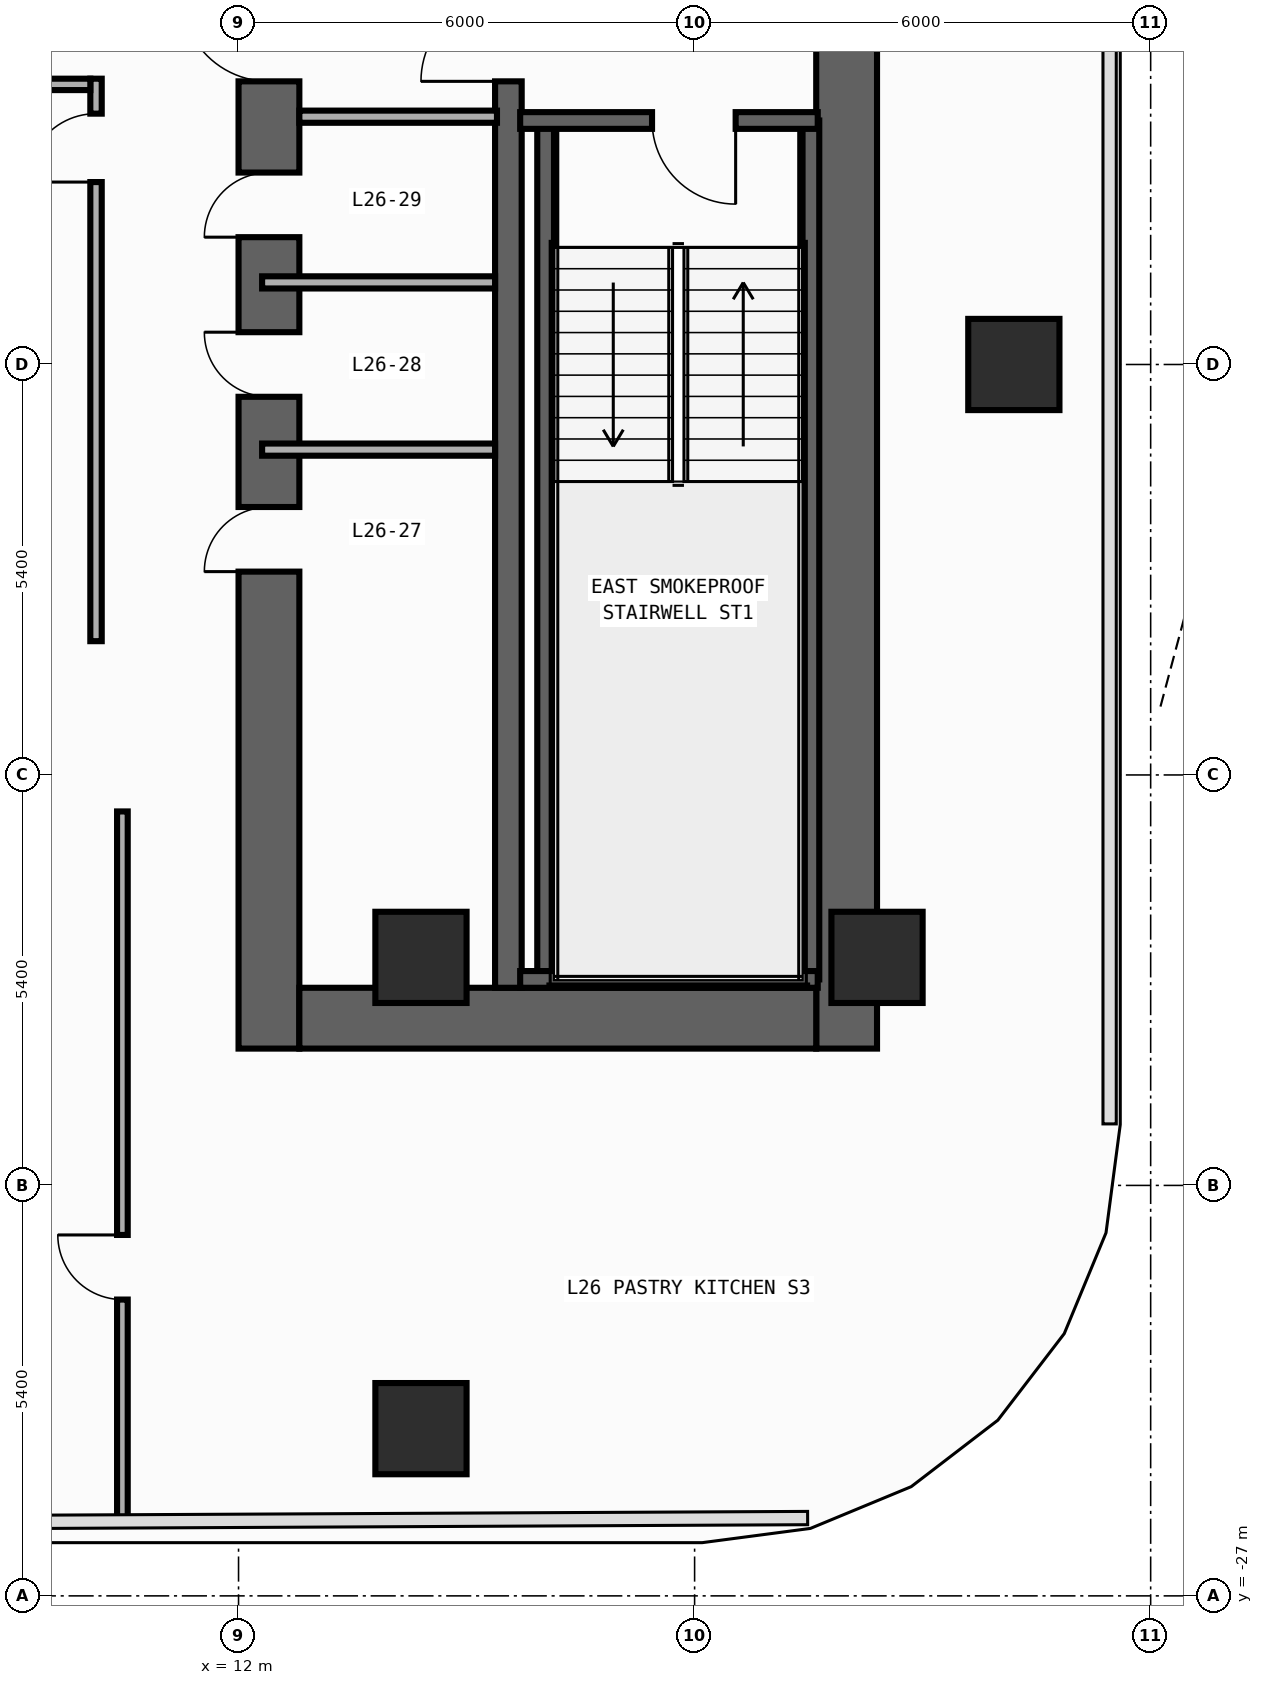
"""IFC4 building model, lengths in metres.
Left out: names, types, materials, properties, quantities, classifications, styles, units other than length and angle.
Written with IfcOpenShell. Run it as: python <this file> out.ifc"""

import sys

from ifc_helpers import new_model, si_unit, direction, frame, frame_2d, origin, origin_2d, place, context, subcontext, project, spatial, rectangle, extrude, element, fill, save


model = new_model("IFC4")
c1 = context("Model", 3, precision=1e-05, world=origin(), true_north=direction((0.0, 1.0)))
c2 = subcontext(c1, "Body", "Model", "MODEL_VIEW")
j1 = project(units=[si_unit("LENGTHUNIT", "METRE"), si_unit("PLANEANGLEUNIT", "RADIAN")], contexts=[c1])
p1 = place(None, origin())
s1 = spatial("IfcSite", under=j1, at=p1, CompositionType="ELEMENT")
p2 = place(p1, origin())
s2 = spatial("IfcBuilding", under=s1, at=p2, CompositionType="ELEMENT")
p3 = place(p2, frame((0.0, 0.0, 114.2)))
s3 = spatial("IfcBuildingStorey", under=s2, at=p3, CompositionType="ELEMENT", Elevation=114.2)
p4 = place(p3, frame((12.4, -19.8, 0.0), z_axis=(0.0, 0.0, 1.0), x_axis=(0.0, 1.0, 0.0)))
e1 = element("IfcWall", 1, at=p4, inside=s3, PredefinedType="SHEAR", context=c2, shape_type="SweptSolid", body=[
    extrude(rectangle(XDim=27.0, YDim=0.8, at=frame_2d((13.5, 0.0))), origin(), (0.0, 0.0, 1.0), 3.94),
])
p5 = place(p4, frame((23.05, 0.0, 0.0)))
e2 = element("IfcOpeningElement", 2, at=p5, cuts=e1, PredefinedType="OPENING", context=c2, shape_type="SweptSolid", body=[
    extrude(rectangle(XDim=1.1, YDim=2.2, at=frame_2d((0.55, 1.1))), frame((0.0, 0.41, 0.0), z_axis=(0.0, -1.0, 0.0), x_axis=(1.0, 0.0, 0.0)), (0.0, 0.0, 1.0), 0.82),
])
p6 = place(p4, frame((19.85, 0.0, 0.0)))
e3 = element("IfcOpeningElement", 3, at=p6, cuts=e1, PredefinedType="OPENING", context=c2, shape_type="SweptSolid", body=[
    extrude(rectangle(XDim=1.1, YDim=2.2, at=frame_2d((0.55, 1.1))), frame((0.0, 0.41, 0.0), z_axis=(0.0, -1.0, 0.0), x_axis=(1.0, 0.0, 0.0)), (0.0, 0.0, 1.0), 0.82),
])
p7 = place(p4, frame((16.65, 0.0, 0.0)))
e4 = element("IfcOpeningElement", 4, at=p7, cuts=e1, PredefinedType="OPENING", context=c2, shape_type="SweptSolid", body=[
    extrude(rectangle(XDim=1.1, YDim=2.2, at=frame_2d((0.55, 1.1))), frame((0.0, 0.41, 0.0), z_axis=(0.0, -1.0, 0.0), x_axis=(1.0, 0.0, 0.0)), (0.0, 0.0, 1.0), 0.82),
])
p8 = place(p4, frame((6.275, 0.0, 0.0)))
e5 = element("IfcOpeningElement", 5, at=p8, cuts=e1, PredefinedType="OPENING", context=c2, shape_type="SweptSolid", body=[
    extrude(rectangle(XDim=0.85, YDim=2.1, at=frame_2d((0.425, 1.05))), frame((0.0, 0.41, 0.0), z_axis=(0.0, -1.0, 0.0), x_axis=(1.0, 0.0, 0.0)), (0.0, 0.0, 1.0), 0.82),
])
p9 = place(p4, frame((8.575, 0.0, 0.0)))
e6 = element("IfcOpeningElement", 6, at=p9, cuts=e1, PredefinedType="OPENING", context=c2, shape_type="SweptSolid", body=[
    extrude(rectangle(XDim=0.85, YDim=2.1, at=frame_2d((0.425, 1.05))), frame((0.0, 0.41, 0.0), z_axis=(0.0, -1.0, 0.0), x_axis=(1.0, 0.0, 0.0)), (0.0, 0.0, 1.0), 0.82),
])
p10 = place(p4, frame((10.675, 0.0, 0.0)))
e7 = element("IfcOpeningElement", 7, at=p10, cuts=e1, PredefinedType="OPENING", context=c2, shape_type="SweptSolid", body=[
    extrude(rectangle(XDim=0.85, YDim=2.1, at=frame_2d((0.425, 1.05))), frame((0.0, 0.41, 0.0), z_axis=(0.0, -1.0, 0.0), x_axis=(1.0, 0.0, 0.0)), (0.0, 0.0, 1.0), 0.82),
])
p11 = place(p4, frame((12.725, 0.0, 0.0)))
e8 = element("IfcOpeningElement", 8, at=p11, cuts=e1, PredefinedType="OPENING", context=c2, shape_type="SweptSolid", body=[
    extrude(rectangle(XDim=1.15, YDim=2.2, at=frame_2d((0.575, 1.1))), frame((0.0, 0.41, 0.0), z_axis=(0.0, -1.0, 0.0), x_axis=(1.0, 0.0, 0.0)), (0.0, 0.0, 1.0), 0.82),
])
p12 = place(p4, frame((25.125, 0.0, 0.0)))
e9 = element("IfcOpeningElement", 9, at=p12, cuts=e1, PredefinedType="OPENING", context=c2, shape_type="SweptSolid", body=[
    extrude(rectangle(XDim=0.85, YDim=2.1, at=frame_2d((0.425, 1.05))), frame((0.0, 0.41, 0.0), z_axis=(0.0, -1.0, 0.0), x_axis=(1.0, 0.0, 0.0)), (0.0, 0.0, 1.0), 0.82),
])
p13 = place(p3, frame((20.0, -19.8, 0.0), z_axis=(0.0, 0.0, 1.0), x_axis=(0.0, 1.0, 0.0)))
e10 = element("IfcWall", 10, at=p13, inside=s3, PredefinedType="SHEAR", context=c2, shape_type="SweptSolid", body=[
    extrude(rectangle(XDim=27.0, YDim=0.8, at=frame_2d((13.5, 0.0))), origin(), (0.0, 0.0, 1.0), 3.94),
])
p14 = place(p3, frame((12.8, -19.4, 0.0), z_axis=(0.0, 0.0, 1.0), x_axis=(1.0, 0.0, 0.0)))
e11 = element("IfcWall", 11, at=p14, inside=s3, PredefinedType="SHEAR", context=c2, shape_type="SweptSolid", body=[
    extrude(rectangle(XDim=6.8, YDim=0.8, at=frame_2d((3.4, 0.0))), origin(), (0.0, 0.0, 1.0), 3.94),
])
p15 = place(p3, frame((15.55, -19.0, 0.0), z_axis=(0.0, 0.0, 1.0), x_axis=(0.0, 1.0, 0.0)))
e12 = element("IfcWall", 12, at=p15, inside=s3, PredefinedType="SHEAR", context=c2, shape_type="SweptSolid", body=[
    extrude(rectangle(XDim=25.4, YDim=0.35, at=frame_2d((12.7, 0.0))), origin(), (0.0, 0.0, 1.0), 3.94),
])
p16 = place(p15, frame((11.925, 0.0, 0.0)))
e13 = element("IfcOpeningElement", 13, at=p16, cuts=e12, PredefinedType="OPENING", context=c2, shape_type="SweptSolid", body=[
    extrude(rectangle(XDim=1.15, YDim=2.2, at=frame_2d((0.575, 1.1))), frame((0.0, 0.185, 0.0), z_axis=(0.0, -1.0, 0.0), x_axis=(1.0, 0.0, 0.0)), (0.0, 0.0, 1.0), 0.37),
])
p17 = place(p15, frame((24.325, 0.0, 0.0)))
e14 = element("IfcOpeningElement", 14, at=p17, cuts=e12, PredefinedType="OPENING", context=c2, shape_type="SweptSolid", body=[
    extrude(rectangle(XDim=0.85, YDim=2.1, at=frame_2d((0.425, 1.05))), frame((0.0, 0.185, 0.0), z_axis=(0.0, -1.0, 0.0), x_axis=(1.0, 0.0, 0.0)), (0.0, 0.0, 1.0), 0.37),
])
for number, where, z_axis, x_axis in (
    (15, (16.04, -18.89, 0.0), (0.0, 0.0, 1.0), (0.0, 1.0, 0.0)),
    (16, (19.53, -18.89, 0.0), (0.0, 0.0, 1.0), (0.0, 1.0, 0.0)),
):
    element("IfcWall", number, at=place(p3, frame(where, z_axis=z_axis, x_axis=x_axis)), inside=s3, PredefinedType="SHEAR", context=c2, shape_type="SweptSolid", body=[
        extrude(rectangle(XDim=11.3, YDim=0.22, at=frame_2d((5.65, 0.0))), origin(), (0.0, 0.0, 1.0), 3.94),
    ])
p18 = place(p3, frame((15.705, -18.89, 0.0), z_axis=(0.0, 0.0, 1.0), x_axis=(1.0, 0.0, 0.0)))
e17 = element("IfcWall", 17, at=p18, inside=s3, PredefinedType="SHEAR", context=c2, shape_type="SweptSolid", body=[
    extrude(rectangle(XDim=3.915, YDim=0.22, at=frame_2d((1.958, 0.0))), origin(), (0.0, 0.0, 1.0), 3.94),
])
p19 = place(p3, frame((19.62, -7.59, 0.0), z_axis=(0.0, 0.0, 1.0), x_axis=(-1.0, 0.0, 0.0)))
e18 = element("IfcWall", 18, at=p19, inside=s3, PredefinedType="SHEAR", context=c2, shape_type="SweptSolid", body=[
    extrude(rectangle(XDim=3.915, YDim=0.22, at=frame_2d((1.958, 0.0))), origin(), (0.0, 0.0, 1.0), 3.94),
])
p20 = place(p19, frame((1.08, 0.0, 0.0)))
e19 = element("IfcOpeningElement", 19, at=p20, cuts=e18, PredefinedType="OPENING", context=c2, shape_type="SweptSolid", body=[
    extrude(rectangle(XDim=1.1, YDim=2.2, at=frame_2d((0.55, 1.1))), frame((0.0, 0.12, 0.0), z_axis=(0.0, -1.0, 0.0), x_axis=(1.0, 0.0, 0.0)), (0.0, 0.0, 1.0), 0.24),
])
for number, where, z_axis, x_axis in (
    (20, (20.4, -18.6, 0.0), (0.0, 0.0, 1.0), (1.0, 0.0, 0.0)),
    (21, (14.4, -18.6, 0.0), (0.0, 0.0, 1.0), (1.0, 0.0, 0.0)),
    (22, (22.2, -10.8, 0.0), (0.0, 0.0, 1.0), (1.0, 0.0, 0.0)),
    (23, (14.4, -24.8, 0.0), (0.0, 0.0, 1.0), (1.0, 0.0, 0.0)),
):
    element("IfcColumn", number, at=place(p3, frame(where, z_axis=z_axis, x_axis=x_axis)), inside=s3, PredefinedType="COLUMN", context=c2, shape_type="SweptSolid", body=[
        extrude(rectangle(XDim=1.2, YDim=1.2, at=origin_2d()), origin(), (0.0, 0.0, 1.0), 4.2),
    ])
p21 = place(p3, frame((12.8, -7.54, 0.0), z_axis=(0.0, 0.0, 1.0), x_axis=(1.0, 0.0, 0.0)))
e24 = element("IfcWall", 24, at=p21, inside=s3, PredefinedType="STANDARD", context=c2, shape_type="SweptSolid", body=[
    extrude(rectangle(XDim=2.6, YDim=0.16, at=frame_2d((1.3, 0.0))), origin(), (0.0, 0.0, 1.0), 3.94),
])
for number, where, z_axis, x_axis in (
    (25, (12.31, -11.92, 0.0), (0.0, 0.0, 1.0), (1.0, 0.0, 0.0)),
    (26, (12.31, -9.72, 0.0), (0.0, 0.0, 1.0), (1.0, 0.0, 0.0)),
):
    element("IfcWall", number, at=place(p3, frame(where, z_axis=z_axis, x_axis=x_axis)), inside=s3, PredefinedType="PARTITIONING", context=c2, shape_type="SweptSolid", body=[
        extrude(rectangle(XDim=3.065, YDim=0.16, at=frame_2d((1.532, 0.0))), origin(), (0.0, 0.0, 1.0), 3.94),
    ])
p22 = place(p3, frame((10.125, -14.44, 0.0), z_axis=(0.0, 0.0, 1.0), x_axis=(0.0, 1.0, 0.0)))
e27 = element("IfcWall", 27, at=p22, inside=s3, PredefinedType="PARTITIONING", context=c2, shape_type="SweptSolid", body=[
    extrude(rectangle(XDim=7.4, YDim=0.15, at=frame_2d((3.7, 0.0))), origin(), (0.0, 0.0, 1.0), 3.94),
])
p23 = place(p22, frame((6.04, 0.0, 0.0)))
e28 = element("IfcOpeningElement", 28, at=p23, cuts=e27, PredefinedType="OPENING", context=c2, shape_type="SweptSolid", body=[
    extrude(rectangle(XDim=0.9, YDim=2.15, at=frame_2d((0.45, 1.075))), frame((0.0, 0.085, 0.0), z_axis=(0.0, -1.0, 0.0), x_axis=(1.0, 0.0, 0.0)), (0.0, 0.0, 1.0), 0.17),
])
p24 = place(p3, frame((-0.015, -7.115, 0.0), z_axis=(0.0, 0.0, 1.0), x_axis=(1.0, 0.0, 0.0)))
e29 = element("IfcWall", 29, at=p24, inside=s3, PredefinedType="PARTITIONING", context=c2, shape_type="SweptSolid", body=[
    extrude(rectangle(XDim=10.065, YDim=0.15, at=frame_2d((5.032, 0.0))), origin(), (0.0, 0.0, 1.0), 3.94),
])
p25 = place(p24, frame((0.46, 0.0, 0.0)))
e30 = element("IfcOpeningElement", 30, at=p25, cuts=e29, PredefinedType="OPENING", context=c2, shape_type="SweptSolid", body=[
    extrude(rectangle(XDim=0.9, YDim=2.15, at=frame_2d((0.45, 1.075))), frame((0.0, 0.085, 0.0), z_axis=(0.0, -1.0, 0.0), x_axis=(1.0, 0.0, 0.0)), (0.0, 0.0, 1.0), 0.17),
])
p26 = place(p3, frame((10.472, -26.015, 0.0), z_axis=(0.0, 0.0, 1.0), x_axis=(0.0, 1.0, 0.0)))
e31 = element("IfcWall", 31, at=p26, inside=s3, PredefinedType="PARTITIONING", context=c2, shape_type="SweptSolid", body=[
    extrude(rectangle(XDim=9.335, YDim=0.14, at=frame_2d((4.668, 0.0))), origin(), (0.0, 0.0, 1.0), 3.94),
])
p27 = place(p26, frame((2.914, 0.0, 0.0)))
e32 = element("IfcOpeningElement", 32, at=p27, cuts=e31, PredefinedType="OPENING", context=c2, shape_type="SweptSolid", body=[
    extrude(rectangle(XDim=0.85, YDim=2.1, at=frame_2d((0.425, 1.05))), frame((0.0, 0.08, 0.0), z_axis=(0.0, -1.0, 0.0), x_axis=(1.0, 0.0, 0.0)), (0.0, 0.0, 1.0), 0.16),
])
p28 = place(p20, origin())
e33 = element("IfcDoor", 33, at=p28, inside=s3, OperationType="SINGLE_SWING_LEFT", PredefinedType="DOOR", context=c2, shape_type="SweptSolid", body=[
    extrude(rectangle(XDim=1.1, YDim=2.2, at=frame_2d((0.55, 1.1))), frame((0.0, 0.025, 0.0), z_axis=(0.0, -1.0, 0.0), x_axis=(1.0, 0.0, 0.0)), (0.0, 0.0, 1.0), 0.05),
])
fill(e19, e33)
p29 = place(p8, origin())
e34 = element("IfcDoor", 34, at=p29, inside=s3, OperationType="SINGLE_SWING_LEFT", PredefinedType="DOOR", context=c2, shape_type="SweptSolid", body=[
    extrude(rectangle(XDim=0.85, YDim=2.1, at=frame_2d((0.425, 1.05))), frame((0.0, 0.025, 0.0), z_axis=(0.0, -1.0, 0.0), x_axis=(1.0, 0.0, 0.0)), (0.0, 0.0, 1.0), 0.05),
])
fill(e5, e34)
p30 = place(p9, origin())
e35 = element("IfcDoor", 35, at=p30, inside=s3, OperationType="SINGLE_SWING_RIGHT", PredefinedType="DOOR", context=c2, shape_type="SweptSolid", body=[
    extrude(rectangle(XDim=0.85, YDim=2.1, at=frame_2d((0.425, 1.05))), frame((0.0, 0.025, 0.0), z_axis=(0.0, -1.0, 0.0), x_axis=(1.0, 0.0, 0.0)), (0.0, 0.0, 1.0), 0.05),
])
fill(e6, e35)
p31 = place(p10, origin())
e36 = element("IfcDoor", 36, at=p31, inside=s3, OperationType="SINGLE_SWING_LEFT", PredefinedType="DOOR", context=c2, shape_type="SweptSolid", body=[
    extrude(rectangle(XDim=0.85, YDim=2.1, at=frame_2d((0.425, 1.05))), frame((0.0, 0.025, 0.0), z_axis=(0.0, -1.0, 0.0), x_axis=(1.0, 0.0, 0.0)), (0.0, 0.0, 1.0), 0.05),
])
fill(e7, e36)
p32 = place(p11, origin())
e37 = element("IfcDoor", 37, at=p32, inside=s3, OperationType="SINGLE_SWING_RIGHT", PredefinedType="DOOR", context=c2, shape_type="SweptSolid", body=[
    extrude(rectangle(XDim=1.15, YDim=2.2, at=frame_2d((0.575, 1.1))), frame((0.0, 0.025, 0.0), z_axis=(0.0, -1.0, 0.0), x_axis=(1.0, 0.0, 0.0)), (0.0, 0.0, 1.0), 0.05),
])
fill(e8, e37)
p33 = place(p16, origin())
e38 = element("IfcDoor", 38, at=p33, inside=s3, OperationType="SINGLE_SWING_LEFT", PredefinedType="DOOR", context=c2, shape_type="SweptSolid", body=[
    extrude(rectangle(XDim=1.15, YDim=2.2, at=frame_2d((0.575, 1.1))), frame((0.0, 0.025, 0.0), z_axis=(0.0, -1.0, 0.0), x_axis=(1.0, 0.0, 0.0)), (0.0, 0.0, 1.0), 0.05),
])
fill(e13, e38)
p34 = place(p23, origin())
e39 = element("IfcDoor", 39, at=p34, inside=s3, OperationType="SINGLE_SWING_LEFT", PredefinedType="DOOR", context=c2, shape_type="SweptSolid", body=[
    extrude(rectangle(XDim=0.9, YDim=2.15, at=frame_2d((0.45, 1.075))), frame((0.0, 0.025, 0.0), z_axis=(0.0, -1.0, 0.0), x_axis=(1.0, 0.0, 0.0)), (0.0, 0.0, 1.0), 0.05),
])
fill(e28, e39)
p35 = place(p27, origin())
e40 = element("IfcDoor", 40, at=p35, inside=s3, OperationType="SINGLE_SWING_RIGHT", PredefinedType="DOOR", context=c2, shape_type="SweptSolid", body=[
    extrude(rectangle(XDim=0.85, YDim=2.1, at=frame_2d((0.425, 1.05))), frame((0.0, 0.025, 0.0), z_axis=(0.0, -1.0, 0.0), x_axis=(1.0, 0.0, 0.0)), (0.0, 0.0, 1.0), 0.05),
])
fill(e32, e40)
save(model, sys.argv[1])
